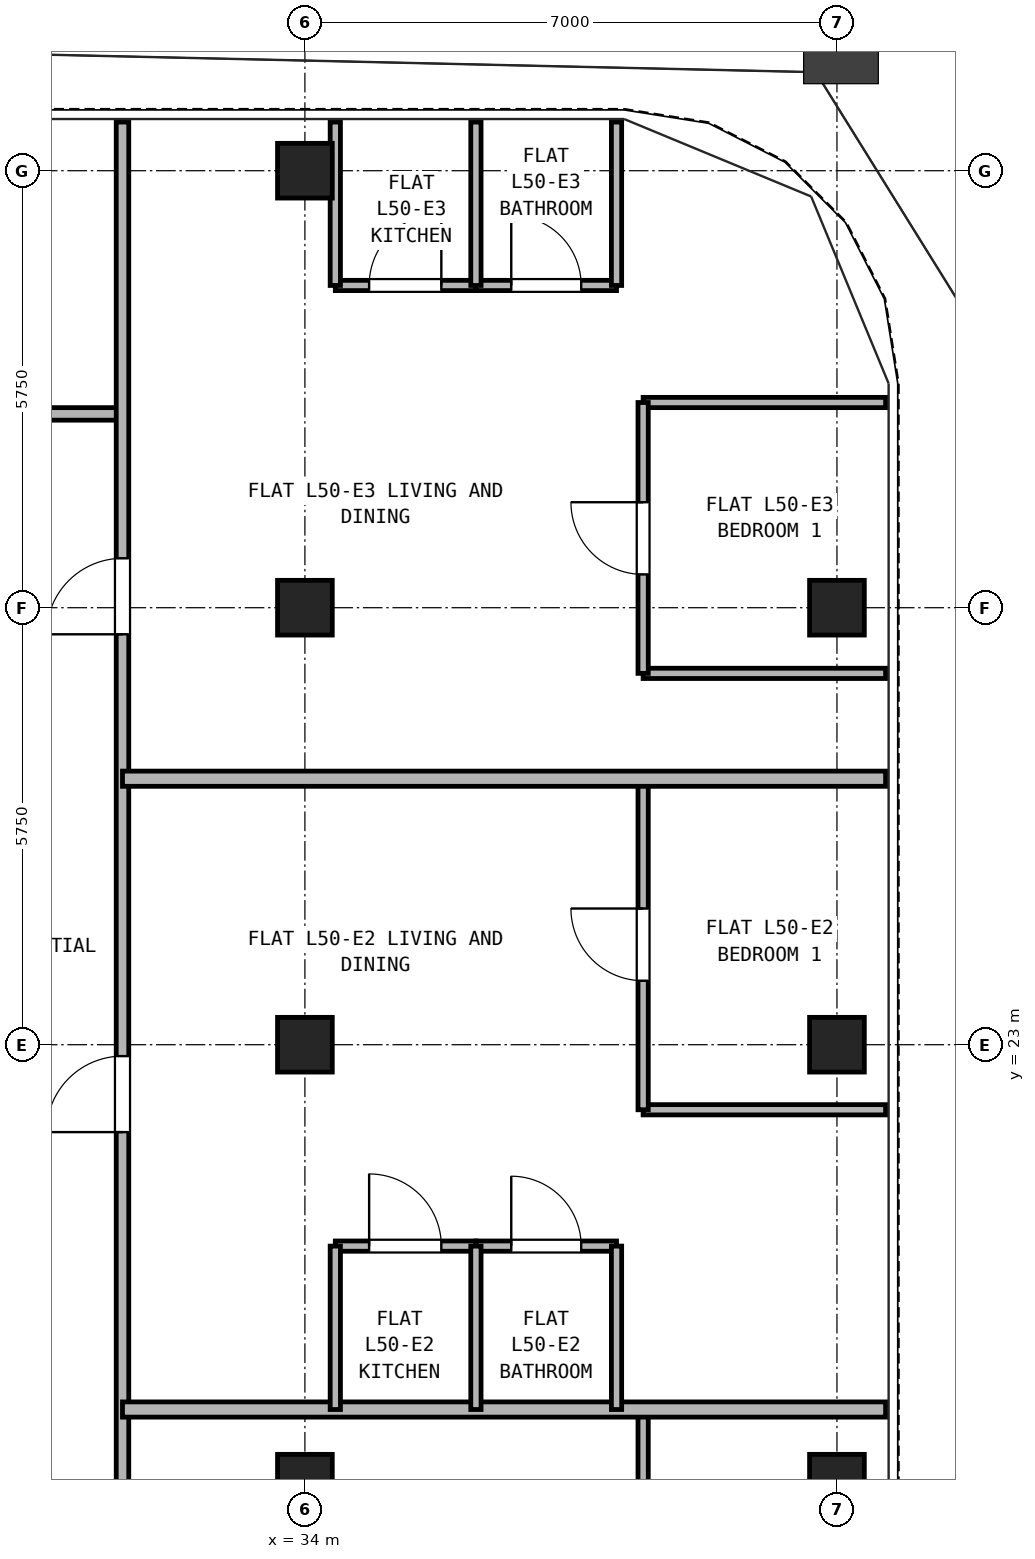
"""IFC4 building model, lengths in metres.
Left out: names, types, materials, properties, quantities, classifications, styles, units other than length and angle.
Written with IfcOpenShell. Run it as: python <this file> out.ifc"""

import sys

from ifc_helpers import new_model, si_unit, direction, frame, frame_2d, origin, origin_2d, place, context, subcontext, project, spatial, rectangle, hollow_rectangle, extrude, source, transform, mapped, element, fill, save


model = new_model("IFC4")
c1 = context("Model", 3, precision=1e-05, world=origin(), true_north=direction((0.0, 1.0)))
c2 = subcontext(c1, "Body", "Model", "MODEL_VIEW")
j1 = project(units=[si_unit("LENGTHUNIT", "METRE"), si_unit("PLANEANGLEUNIT", "RADIAN")], contexts=[c1])
p1 = place(None, origin())
s1 = spatial("IfcSite", under=j1, at=p1, CompositionType="ELEMENT")
p2 = place(p1, origin())
s2 = spatial("IfcBuilding", under=s1, at=p2, CompositionType="ELEMENT")
p3 = place(p2, frame((0.0, 0.0, 178.5)))
s3 = spatial("IfcBuildingStorey", under=s2, at=p3, CompositionType="ELEMENT", Elevation=178.5)
m1 = source(origin(), c2, "Body", "SweptSolid", [
    extrude(hollow_rectangle(XDim=0.72, YDim=0.72, WallThickness=0.04, at=origin_2d()), origin(), (0.0, 0.0, 1.0), 2.95),
])
for number, where, z_axis, x_axis in (
    (1, (34.0, 34.5, 0.0), (0.0, 0.0, 1.0), (1.0, 0.0, 0.0)),
    (2, (41.0, 17.25, 0.0), (0.0, 0.0, 1.0), (1.0, 0.0, 0.0)),
    (3, (41.0, 23.0, 0.0), (0.0, 0.0, 1.0), (1.0, 0.0, 0.0)),
    (4, (41.0, 28.75, 0.0), (0.0, 0.0, 1.0), (1.0, 0.0, 0.0)),
    (5, (34.0, 17.25, 0.0), (0.0, 0.0, 1.0), (1.0, 0.0, 0.0)),
    (6, (34.0, 23.0, 0.0), (0.0, 0.0, 1.0), (1.0, 0.0, 0.0)),
    (7, (34.0, 28.75, 0.0), (0.0, 0.0, 1.0), (1.0, 0.0, 0.0)),
):
    element("IfcColumn", number, at=place(p3, frame(where, z_axis=z_axis, x_axis=x_axis)), inside=s3, PredefinedType="COLUMN", context=c2, shape_type="MappedRepresentation", body=[
        mapped(m1, transform((0.0, 0.0, 0.0), x_axis=(1.0, 0.0, 0.0), y_axis=(0.0, 1.0, 0.0), z_axis=(0.0, 0.0, 1.0), scale=1.0)),
    ])
p4 = place(p3, frame((15.4, 31.3, 0.0), z_axis=(0.0, 0.0, 1.0), x_axis=(1.0, 0.0, 0.0)))
e8 = element("IfcWall", 8, at=p4, inside=s3, PredefinedType="PARTITIONING", context=c2, shape_type="SweptSolid", body=[
    extrude(rectangle(XDim=16.2, YDim=0.165, at=frame_2d((8.1, 0.0))), origin(), (0.0, 0.0, 1.0), 2.95),
])
p5 = place(p4, frame((2.8, 0.0, 0.0)))
e9 = element("IfcOpeningElement", 9, at=p5, cuts=e8, PredefinedType="OPENING", context=c2, shape_type="SweptSolid", body=[
    extrude(rectangle(XDim=0.95, YDim=2.15, at=frame_2d((0.475, 1.075))), frame((0.0, 0.093, 0.0), z_axis=(0.0, -1.0, 0.0), x_axis=(1.0, 0.0, 0.0)), (0.0, 0.0, 1.0), 0.185),
])
p6 = place(p4, frame((8.15, 0.0, 0.0)))
e10 = element("IfcOpeningElement", 10, at=p6, cuts=e8, PredefinedType="OPENING", context=c2, shape_type="SweptSolid", body=[
    extrude(rectangle(XDim=0.95, YDim=2.15, at=frame_2d((0.475, 1.075))), frame((0.0, 0.093, 0.0), z_axis=(0.0, -1.0, 0.0), x_axis=(1.0, 0.0, 0.0)), (0.0, 0.0, 1.0), 0.185),
])
p7 = place(p4, frame((12.95, 0.0, 0.0)))
e11 = element("IfcOpeningElement", 11, at=p7, cuts=e8, PredefinedType="OPENING", context=c2, shape_type="SweptSolid", body=[
    extrude(rectangle(XDim=0.92, YDim=2.1, at=frame_2d((0.46, 1.05))), frame((0.0, 0.093, 0.0), z_axis=(0.0, -1.0, 0.0), x_axis=(1.0, 0.0, 0.0)), (0.0, 0.0, 1.0), 0.185),
])
p8 = place(p3, frame((31.6, 10.7, 0.0), z_axis=(0.0, 0.0, 1.0), x_axis=(0.0, 1.0, 0.0)))
e12 = element("IfcWall", 12, at=p8, inside=s3, PredefinedType="PARTITIONING", context=c2, shape_type="SweptSolid", body=[
    extrude(rectangle(XDim=24.44, YDim=0.165, at=frame_2d((12.22, 0.0))), origin(), (0.0, 0.0, 1.0), 2.95),
])
p9 = place(p8, frame((3.25, 0.0, 0.0)))
e13 = element("IfcOpeningElement", 13, at=p9, cuts=e12, PredefinedType="OPENING", context=c2, shape_type="SweptSolid", body=[
    extrude(rectangle(XDim=1.0, YDim=2.15, at=frame_2d((0.5, 1.075))), frame((0.0, 0.093, 0.0), z_axis=(0.0, -1.0, 0.0), x_axis=(1.0, 0.0, 0.0)), (0.0, 0.0, 1.0), 0.185),
])
p10 = place(p8, frame((11.15, 0.0, 0.0)))
e14 = element("IfcOpeningElement", 14, at=p10, cuts=e12, PredefinedType="OPENING", context=c2, shape_type="SweptSolid", body=[
    extrude(rectangle(XDim=1.0, YDim=2.15, at=frame_2d((0.5, 1.075))), frame((0.0, 0.093, 0.0), z_axis=(0.0, -1.0, 0.0), x_axis=(1.0, 0.0, 0.0)), (0.0, 0.0, 1.0), 0.185),
])
p11 = place(p8, frame((17.7, 0.0, 0.0)))
e15 = element("IfcOpeningElement", 15, at=p11, cuts=e12, PredefinedType="OPENING", context=c2, shape_type="SweptSolid", body=[
    extrude(rectangle(XDim=1.0, YDim=2.15, at=frame_2d((0.5, 1.075))), frame((0.0, 0.093, 0.0), z_axis=(0.0, -1.0, 0.0), x_axis=(1.0, 0.0, 0.0)), (0.0, 0.0, 1.0), 0.185),
])
p12 = place(p3, frame((38.45, 14.42, 0.0), z_axis=(0.0, 0.0, 1.0), x_axis=(0.0, 1.0, 0.0)))
e16 = element("IfcWall", 16, at=p12, inside=s3, PredefinedType="PARTITIONING", context=c2, shape_type="SweptSolid", body=[
    extrude(rectangle(XDim=3.78, YDim=0.135, at=frame_2d((1.89, 0.0))), origin(), (0.0, 0.0, 1.0), 2.95),
])
p13 = place(p12, frame((1.41, 0.0, 0.0)))
e17 = element("IfcOpeningElement", 17, at=p13, cuts=e16, PredefinedType="OPENING", context=c2, shape_type="SweptSolid", body=[
    extrude(rectangle(XDim=0.95, YDim=2.15, at=frame_2d((0.475, 1.075))), frame((0.0, 0.077, 0.0), z_axis=(0.0, -1.0, 0.0), x_axis=(1.0, 0.0, 0.0)), (0.0, 0.0, 1.0), 0.155),
])
p14 = place(p3, frame((31.6, 18.2, 0.0), z_axis=(0.0, 0.0, 1.0), x_axis=(1.0, 0.0, 0.0)))
e18 = element("IfcWall", 18, at=p14, inside=s3, PredefinedType="PARTITIONING", context=c2, shape_type="SweptSolid", body=[
    extrude(rectangle(XDim=10.04, YDim=0.2, at=frame_2d((5.02, 0.0))), origin(), (0.0, 0.0, 1.0), 2.95),
])
p15 = place(p3, frame((34.4, 20.35, 0.0), z_axis=(0.0, 0.0, 1.0), x_axis=(1.0, 0.0, 0.0)))
e19 = element("IfcWall", 19, at=p15, inside=s3, PredefinedType="PARTITIONING", context=c2, shape_type="SweptSolid", body=[
    extrude(rectangle(XDim=1.85, YDim=0.135, at=frame_2d((0.925, 0.0))), origin(), (0.0, 0.0, 1.0), 2.583),
])
p16 = place(p15, frame((0.445, 0.0, 0.0)))
e20 = element("IfcOpeningElement", 20, at=p16, cuts=e19, PredefinedType="OPENING", context=c2, shape_type="SweptSolid", body=[
    extrude(rectangle(XDim=0.95, YDim=2.15, at=frame_2d((0.475, 1.075))), frame((0.0, 0.077, 0.0), z_axis=(0.0, -1.0, 0.0), x_axis=(1.0, 0.0, 0.0)), (0.0, 0.0, 1.0), 0.155),
])
p17 = place(p3, frame((36.25, 20.35, 0.0), z_axis=(0.0, 0.0, 1.0), x_axis=(1.0, 0.0, 0.0)))
e21 = element("IfcWall", 21, at=p17, inside=s3, PredefinedType="PARTITIONING", context=c2, shape_type="SweptSolid", body=[
    extrude(rectangle(XDim=1.85, YDim=0.135, at=frame_2d((0.925, 0.0))), origin(), (0.0, 0.0, 1.0), 2.583),
])
p18 = place(p17, frame((0.465, 0.0, 0.0)))
e22 = element("IfcOpeningElement", 22, at=p18, cuts=e21, PredefinedType="OPENING", context=c2, shape_type="SweptSolid", body=[
    extrude(rectangle(XDim=0.92, YDim=2.1, at=frame_2d((0.46, 1.05))), frame((0.0, 0.077, 0.0), z_axis=(0.0, -1.0, 0.0), x_axis=(1.0, 0.0, 0.0)), (0.0, 0.0, 1.0), 0.155),
])
for number, where, z_axis, x_axis in (
    (23, (34.4, 18.2, 0.0), (0.0, 0.0, 1.0), (0.0, 1.0, 0.0)),
    (24, (36.25, 18.2, 0.0), (0.0, 0.0, 1.0), (0.0, 1.0, 0.0)),
    (25, (38.1, 18.2, 0.0), (0.0, 0.0, 1.0), (0.0, 1.0, 0.0)),
):
    element("IfcWall", number, at=place(p3, frame(where, z_axis=z_axis, x_axis=x_axis)), inside=s3, PredefinedType="PARTITIONING", context=c2, shape_type="SweptSolid", body=[
        extrude(rectangle(XDim=2.15, YDim=0.135, at=frame_2d((1.075, 0.0))), origin(), (0.0, 0.0, 1.0), 2.95),
    ])
p19 = place(p3, frame((38.45, 22.144, 0.0), z_axis=(0.0, 0.0, 1.0), x_axis=(1.0, 0.0, 0.0)))
e26 = element("IfcWall", 26, at=p19, inside=s3, PredefinedType="PARTITIONING", context=c2, shape_type="SweptSolid", body=[
    extrude(rectangle(XDim=3.19, YDim=0.135, at=frame_2d((1.595, 0.0))), origin(), (0.0, 0.0, 1.0), 2.95),
])
p20 = place(p3, frame((38.45, 22.144, 0.0), z_axis=(0.0, 0.0, 1.0), x_axis=(0.0, 1.0, 0.0)))
e27 = element("IfcWall", 27, at=p20, inside=s3, PredefinedType="PARTITIONING", context=c2, shape_type="SweptSolid", body=[
    extrude(rectangle(XDim=4.356, YDim=0.135, at=frame_2d((2.178, 0.0))), origin(), (0.0, 0.0, 1.0), 2.95),
])
p21 = place(p20, frame((1.698, 0.0, 0.0)))
e28 = element("IfcOpeningElement", 28, at=p21, cuts=e27, PredefinedType="OPENING", context=c2, shape_type="SweptSolid", body=[
    extrude(rectangle(XDim=0.95, YDim=2.15, at=frame_2d((0.475, 1.075))), frame((0.0, 0.077, 0.0), z_axis=(0.0, -1.0, 0.0), x_axis=(1.0, 0.0, 0.0)), (0.0, 0.0, 1.0), 0.155),
])
p22 = place(p3, frame((31.6, 26.5, 0.0), z_axis=(0.0, 0.0, 1.0), x_axis=(1.0, 0.0, 0.0)))
e29 = element("IfcWall", 29, at=p22, inside=s3, PredefinedType="PARTITIONING", context=c2, shape_type="SweptSolid", body=[
    extrude(rectangle(XDim=10.04, YDim=0.2, at=frame_2d((5.02, 0.0))), origin(), (0.0, 0.0, 1.0), 2.95),
])
p23 = place(p3, frame((34.4, 32.99, 0.0), z_axis=(0.0, 0.0, 1.0), x_axis=(1.0, 0.0, 0.0)))
e30 = element("IfcWall", 30, at=p23, inside=s3, PredefinedType="PARTITIONING", context=c2, shape_type="SweptSolid", body=[
    extrude(rectangle(XDim=1.85, YDim=0.135, at=frame_2d((0.925, 0.0))), origin(), (0.0, 0.0, 1.0), 2.95),
])
p24 = place(p23, frame((0.445, 0.0, 0.0)))
e31 = element("IfcOpeningElement", 31, at=p24, cuts=e30, PredefinedType="OPENING", context=c2, shape_type="SweptSolid", body=[
    extrude(rectangle(XDim=0.95, YDim=2.15, at=frame_2d((0.475, 1.075))), frame((0.0, 0.077, 0.0), z_axis=(0.0, -1.0, 0.0), x_axis=(1.0, 0.0, 0.0)), (0.0, 0.0, 1.0), 0.155),
])
p25 = place(p3, frame((36.25, 32.99, 0.0), z_axis=(0.0, 0.0, 1.0), x_axis=(1.0, 0.0, 0.0)))
e32 = element("IfcWall", 32, at=p25, inside=s3, PredefinedType="PARTITIONING", context=c2, shape_type="SweptSolid", body=[
    extrude(rectangle(XDim=1.85, YDim=0.135, at=frame_2d((0.925, 0.0))), origin(), (0.0, 0.0, 1.0), 2.95),
])
p26 = place(p25, frame((0.465, 0.0, 0.0)))
e33 = element("IfcOpeningElement", 33, at=p26, cuts=e32, PredefinedType="OPENING", context=c2, shape_type="SweptSolid", body=[
    extrude(rectangle(XDim=0.92, YDim=2.1, at=frame_2d((0.46, 1.05))), frame((0.0, 0.077, 0.0), z_axis=(0.0, -1.0, 0.0), x_axis=(1.0, 0.0, 0.0)), (0.0, 0.0, 1.0), 0.155),
])
for number, where, z_axis, x_axis in (
    (34, (34.4, 32.99, 0.0), (0.0, 0.0, 1.0), (0.0, 1.0, 0.0)),
    (35, (36.25, 32.99, 0.0), (0.0, 0.0, 1.0), (0.0, 1.0, 0.0)),
    (36, (38.1, 32.99, 0.0), (0.0, 0.0, 1.0), (0.0, 1.0, 0.0)),
):
    element("IfcWall", number, at=place(p3, frame(where, z_axis=z_axis, x_axis=x_axis)), inside=s3, PredefinedType="PARTITIONING", context=c2, shape_type="SweptSolid", body=[
        extrude(rectangle(XDim=2.15, YDim=0.135, at=frame_2d((1.075, 0.0))), origin(), (0.0, 0.0, 1.0), 2.95),
    ])
for number, where, z_axis, x_axis in (
    (37, (38.45, 27.886, 0.0), (0.0, 0.0, 1.0), (1.0, 0.0, 0.0)),
    (38, (38.45, 31.45, 0.0), (0.0, 0.0, 1.0), (1.0, 0.0, 0.0)),
):
    element("IfcWall", number, at=place(p3, frame(where, z_axis=z_axis, x_axis=x_axis)), inside=s3, PredefinedType="PARTITIONING", context=c2, shape_type="SweptSolid", body=[
        extrude(rectangle(XDim=3.19, YDim=0.135, at=frame_2d((1.595, 0.0))), origin(), (0.0, 0.0, 1.0), 2.95),
    ])
p27 = place(p3, frame((38.45, 27.886, 0.0), z_axis=(0.0, 0.0, 1.0), x_axis=(0.0, 1.0, 0.0)))
e39 = element("IfcWall", 39, at=p27, inside=s3, PredefinedType="PARTITIONING", context=c2, shape_type="SweptSolid", body=[
    extrude(rectangle(XDim=3.564, YDim=0.135, at=frame_2d((1.782, 0.0))), origin(), (0.0, 0.0, 1.0), 2.95),
])
p28 = place(p27, frame((1.302, 0.0, 0.0)))
e40 = element("IfcOpeningElement", 40, at=p28, cuts=e39, PredefinedType="OPENING", context=c2, shape_type="SweptSolid", body=[
    extrude(rectangle(XDim=0.95, YDim=2.15, at=frame_2d((0.475, 1.075))), frame((0.0, 0.077, 0.0), z_axis=(0.0, -1.0, 0.0), x_axis=(1.0, 0.0, 0.0)), (0.0, 0.0, 1.0), 0.155),
])
p29 = place(p16, origin())
e41 = element("IfcDoor", 41, at=p29, inside=s3, OperationType="SINGLE_SWING_LEFT", PredefinedType="DOOR", context=c2, shape_type="SweptSolid", body=[
    extrude(rectangle(XDim=0.95, YDim=2.15, at=frame_2d((0.475, 1.075))), frame((0.0, 0.025, 0.0), z_axis=(0.0, -1.0, 0.0), x_axis=(1.0, 0.0, 0.0)), (0.0, 0.0, 1.0), 0.05),
])
fill(e20, e41)
p30 = place(p18, origin())
e42 = element("IfcDoor", 42, at=p30, inside=s3, OperationType="SINGLE_SWING_LEFT", PredefinedType="DOOR", context=c2, shape_type="SweptSolid", body=[
    extrude(rectangle(XDim=0.92, YDim=2.1, at=frame_2d((0.46, 1.05))), frame((0.0, 0.025, 0.0), z_axis=(0.0, -1.0, 0.0), x_axis=(1.0, 0.0, 0.0)), (0.0, 0.0, 1.0), 0.05),
])
fill(e22, e42)
p31 = place(p21, frame((0.95, 0.0, 0.0), z_axis=(0.0, 0.0, 1.0), x_axis=(-1.0, 0.0, 0.0)))
e43 = element("IfcDoor", 43, at=p31, inside=s3, OperationType="SINGLE_SWING_RIGHT", PredefinedType="DOOR", context=c2, shape_type="SweptSolid", body=[
    extrude(rectangle(XDim=0.95, YDim=2.15, at=frame_2d((0.475, 1.075))), frame((0.0, 0.025, 0.0), z_axis=(0.0, -1.0, 0.0), x_axis=(1.0, 0.0, 0.0)), (0.0, 0.0, 1.0), 0.05),
])
fill(e28, e43)
p32 = place(p10, frame((1.0, 0.0, 0.0), z_axis=(0.0, 0.0, 1.0), x_axis=(-1.0, 0.0, 0.0)))
e44 = element("IfcDoor", 44, at=p32, inside=s3, OperationType="SINGLE_SWING_LEFT", PredefinedType="DOOR", context=c2, shape_type="SweptSolid", body=[
    extrude(rectangle(XDim=1.0, YDim=2.15, at=frame_2d((0.5, 1.075))), frame((0.0, 0.025, 0.0), z_axis=(0.0, -1.0, 0.0), x_axis=(1.0, 0.0, 0.0)), (0.0, 0.0, 1.0), 0.05),
])
fill(e14, e44)
p33 = place(p24, frame((0.95, 0.0, 0.0), z_axis=(0.0, 0.0, 1.0), x_axis=(-1.0, 0.0, 0.0)))
e45 = element("IfcDoor", 45, at=p33, inside=s3, OperationType="SINGLE_SWING_RIGHT", PredefinedType="DOOR", context=c2, shape_type="SweptSolid", body=[
    extrude(rectangle(XDim=0.95, YDim=2.15, at=frame_2d((0.475, 1.075))), frame((0.0, 0.025, 0.0), z_axis=(0.0, -1.0, 0.0), x_axis=(1.0, 0.0, 0.0)), (0.0, 0.0, 1.0), 0.05),
])
fill(e31, e45)
p34 = place(p26, frame((0.92, 0.0, 0.0), z_axis=(0.0, 0.0, 1.0), x_axis=(-1.0, 0.0, 0.0)))
e46 = element("IfcDoor", 46, at=p34, inside=s3, OperationType="SINGLE_SWING_LEFT", PredefinedType="DOOR", context=c2, shape_type="SweptSolid", body=[
    extrude(rectangle(XDim=0.92, YDim=2.1, at=frame_2d((0.46, 1.05))), frame((0.0, 0.025, 0.0), z_axis=(0.0, -1.0, 0.0), x_axis=(1.0, 0.0, 0.0)), (0.0, 0.0, 1.0), 0.05),
])
fill(e33, e46)
p35 = place(p28, frame((0.95, 0.0, 0.0), z_axis=(0.0, 0.0, 1.0), x_axis=(-1.0, 0.0, 0.0)))
e47 = element("IfcDoor", 47, at=p35, inside=s3, OperationType="SINGLE_SWING_RIGHT", PredefinedType="DOOR", context=c2, shape_type="SweptSolid", body=[
    extrude(rectangle(XDim=0.95, YDim=2.15, at=frame_2d((0.475, 1.075))), frame((0.0, 0.025, 0.0), z_axis=(0.0, -1.0, 0.0), x_axis=(1.0, 0.0, 0.0)), (0.0, 0.0, 1.0), 0.05),
])
fill(e40, e47)
p36 = place(p11, frame((1.0, 0.0, 0.0), z_axis=(0.0, 0.0, 1.0), x_axis=(-1.0, 0.0, 0.0)))
e48 = element("IfcDoor", 48, at=p36, inside=s3, OperationType="SINGLE_SWING_LEFT", PredefinedType="DOOR", context=c2, shape_type="SweptSolid", body=[
    extrude(rectangle(XDim=1.0, YDim=2.15, at=frame_2d((0.5, 1.075))), frame((0.0, 0.025, 0.0), z_axis=(0.0, -1.0, 0.0), x_axis=(1.0, 0.0, 0.0)), (0.0, 0.0, 1.0), 0.05),
])
fill(e15, e48)
save(model, sys.argv[1])
